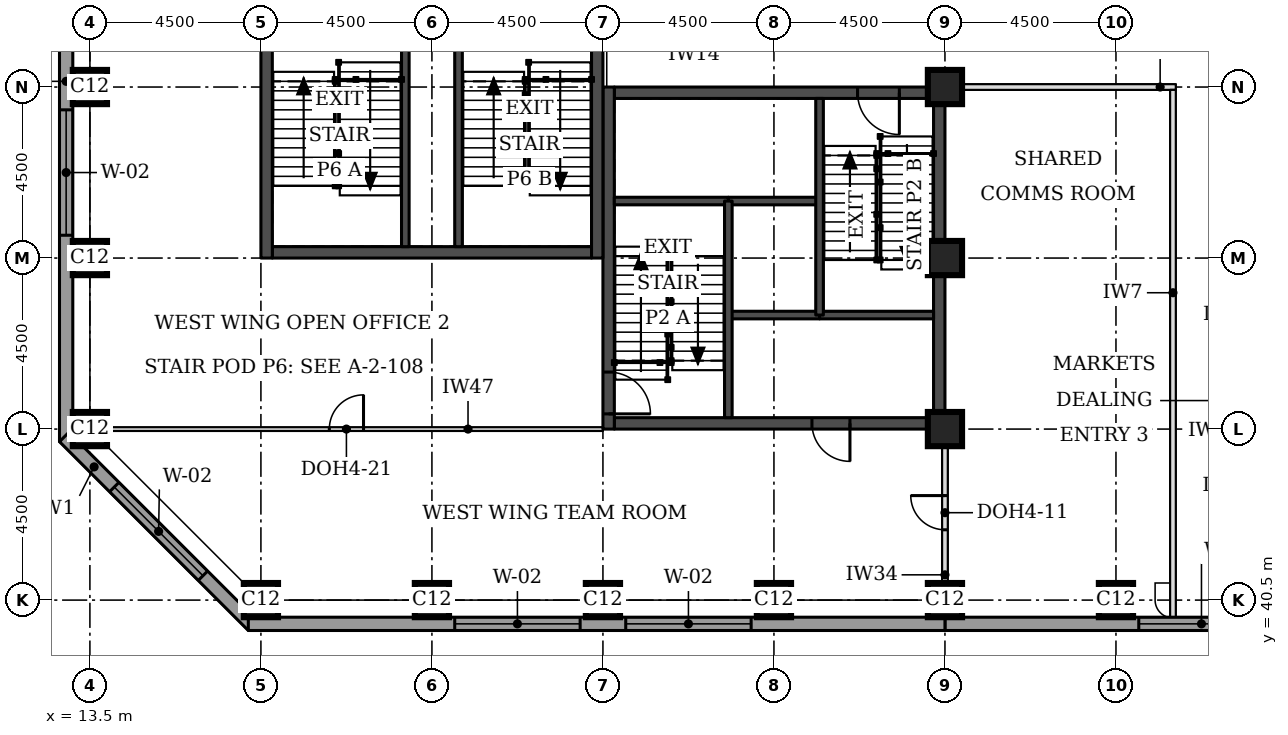
"""IFC4 building model, lengths in metres.
Left out: names, types, materials, properties, quantities, classifications, styles, units other than length and angle.
Written with IfcOpenShell. Run it as: python <this file> out.ifc"""

import sys

from ifc_helpers import new_model, si_unit, direction, frame, frame_2d, origin, origin_2d, place, context, subcontext, project, spatial, rectangle, extrude, element, fill, save


model = new_model("IFC4")
c1 = context("Model", 3, precision=1e-05, world=origin(), true_north=direction((0.0, 1.0)))
c2 = subcontext(c1, "Body", "Model", "MODEL_VIEW")
j1 = project(units=[si_unit("LENGTHUNIT", "METRE"), si_unit("PLANEANGLEUNIT", "RADIAN")], contexts=[c1])
p1 = place(None, origin())
s1 = spatial("IfcSite", under=j1, at=p1, CompositionType="ELEMENT")
p2 = place(p1, origin())
s2 = spatial("IfcBuilding", under=s1, at=p2, CompositionType="ELEMENT")
p3 = place(p2, frame((0.0, 0.0, 169.9)))
s3 = spatial("IfcBuildingStorey", under=s2, at=p3, CompositionType="ELEMENT", Elevation=169.9)
for number, where, z_axis, x_axis in (
    (1, (18.0, 40.5, 0.0), (0.0, 0.0, 1.0), (1.0, 0.0, 0.0)),
    (2, (22.5, 40.5, 0.0), (0.0, 0.0, 1.0), (1.0, 0.0, 0.0)),
    (3, (27.0, 40.5, 0.0), (0.0, 0.0, 1.0), (1.0, 0.0, 0.0)),
    (4, (31.5, 40.5, 0.0), (0.0, 0.0, 1.0), (1.0, 0.0, 0.0)),
    (5, (36.0, 40.5, 0.0), (0.0, 0.0, 1.0), (1.0, 0.0, 0.0)),
    (6, (40.5, 40.5, 0.0), (0.0, 0.0, 1.0), (1.0, 0.0, 0.0)),
    (7, (13.5, 45.0, 0.0), (0.0, 0.0, 1.0), (1.0, 0.0, 0.0)),
    (8, (36.0, 45.0, 0.0), (0.0, 0.0, 1.0), (1.0, 0.0, 0.0)),
    (9, (13.5, 49.5, 0.0), (0.0, 0.0, 1.0), (1.0, 0.0, 0.0)),
    (10, (36.0, 49.5, 0.0), (0.0, 0.0, 1.0), (1.0, 0.0, 0.0)),
    (11, (13.5, 54.0, 0.0), (0.0, 0.0, 1.0), (1.0, 0.0, 0.0)),
    (12, (36.0, 54.0, 0.0), (0.0, 0.0, 1.0), (1.0, 0.0, 0.0)),
):
    element("IfcColumn", number, at=place(p3, frame(where, z_axis=z_axis, x_axis=x_axis)), inside=s3, PredefinedType="COLUMN", context=c2, shape_type="SweptSolid", body=[
        extrude(rectangle(XDim=0.9, YDim=0.9, at=origin_2d()), origin(), (0.0, 0.0, 1.0), 3.7),
    ])
p4 = place(p3, frame((27.3, 45.15, 0.0), z_axis=(0.0, 0.0, 1.0), x_axis=(1.0, 0.0, 0.0)))
e13 = element("IfcWall", 13, at=p4, inside=s3, PredefinedType="SHEAR", context=c2, shape_type="SweptSolid", body=[
    extrude(rectangle(XDim=8.4, YDim=0.3, at=frame_2d((4.2, 0.0))), origin(), (0.0, 0.0, 1.0), 3.7),
])
p5 = place(p4, frame((5.2, 0.0, 0.0)))
e14 = element("IfcOpeningElement", 14, at=p5, cuts=e13, PredefinedType="OPENING", context=c2, shape_type="SweptSolid", body=[
    extrude(rectangle(XDim=1.0, YDim=2.1, at=frame_2d((0.5, 1.05))), frame((0.0, 0.16, 0.0), z_axis=(0.0, -1.0, 0.0), x_axis=(1.0, 0.0, 0.0)), (0.0, 0.0, 1.0), 0.32),
])
p6 = place(p3, frame((27.3, 53.85, 0.0), z_axis=(0.0, 0.0, 1.0), x_axis=(1.0, 0.0, 0.0)))
e15 = element("IfcWall", 15, at=p6, inside=s3, PredefinedType="SHEAR", context=c2, shape_type="SweptSolid", body=[
    extrude(rectangle(XDim=8.4, YDim=0.3, at=frame_2d((4.2, 0.0))), origin(), (0.0, 0.0, 1.0), 3.7),
])
p7 = place(p6, frame((6.4, 0.0, 0.0)))
e16 = element("IfcOpeningElement", 16, at=p7, cuts=e15, PredefinedType="OPENING", context=c2, shape_type="SweptSolid", body=[
    extrude(rectangle(XDim=1.1, YDim=2.1, at=frame_2d((0.55, 1.05))), frame((0.0, 0.16, 0.0), z_axis=(0.0, -1.0, 0.0), x_axis=(1.0, 0.0, 0.0)), (0.0, 0.0, 1.0), 0.32),
])
p8 = place(p3, frame((27.15, 45.0, 0.0), z_axis=(0.0, 0.0, 1.0), x_axis=(0.0, 1.0, 0.0)))
e17 = element("IfcWall", 17, at=p8, inside=s3, PredefinedType="SHEAR", context=c2, shape_type="SweptSolid", body=[
    extrude(rectangle(XDim=9.0, YDim=0.3, at=frame_2d((4.5, 0.0))), origin(), (0.0, 0.0, 1.0), 3.7),
])
p9 = place(p8, frame((0.4, 0.0, 0.0)))
e18 = element("IfcOpeningElement", 18, at=p9, cuts=e17, PredefinedType="OPENING", context=c2, shape_type="SweptSolid", body=[
    extrude(rectangle(XDim=1.1, YDim=2.1, at=frame_2d((0.55, 1.05))), frame((0.0, 0.16, 0.0), z_axis=(0.0, -1.0, 0.0), x_axis=(1.0, 0.0, 0.0)), (0.0, 0.0, 1.0), 0.32),
])
p10 = place(p3, frame((35.85, 45.0, 0.0), z_axis=(0.0, 0.0, 1.0), x_axis=(0.0, 1.0, 0.0)))
e19 = element("IfcWall", 19, at=p10, inside=s3, PredefinedType="SHEAR", context=c2, shape_type="SweptSolid", body=[
    extrude(rectangle(XDim=9.0, YDim=0.3, at=frame_2d((4.5, 0.0))), origin(), (0.0, 0.0, 1.0), 3.7),
])
p11 = place(p3, frame((18.3, 49.65, 0.0), z_axis=(0.0, 0.0, 1.0), x_axis=(1.0, 0.0, 0.0)))
e20 = element("IfcWall", 20, at=p11, inside=s3, PredefinedType="SHEAR", context=c2, shape_type="SweptSolid", body=[
    extrude(rectangle(XDim=8.4, YDim=0.3, at=frame_2d((4.2, 0.0))), origin(), (0.0, 0.0, 1.0), 3.7),
])
p12 = place(p3, frame((18.15, 49.5, 0.0), z_axis=(0.0, 0.0, 1.0), x_axis=(0.0, 1.0, 0.0)))
e21 = element("IfcWall", 21, at=p12, inside=s3, PredefinedType="SHEAR", context=c2, shape_type="SweptSolid", body=[
    extrude(rectangle(XDim=9.0, YDim=0.3, at=frame_2d((4.5, 0.0))), origin(), (0.0, 0.0, 1.0), 3.7),
])
p13 = place(p3, frame((26.85, 49.5, 0.0), z_axis=(0.0, 0.0, 1.0), x_axis=(0.0, 1.0, 0.0)))
e22 = element("IfcWall", 22, at=p13, inside=s3, PredefinedType="SHEAR", context=c2, shape_type="SweptSolid", body=[
    extrude(rectangle(XDim=9.0, YDim=0.3, at=frame_2d((4.5, 0.0))), origin(), (0.0, 0.0, 1.0), 3.7),
])
p14 = place(p13, frame((6.6, 0.0, 0.0)))
e23 = element("IfcOpeningElement", 23, at=p14, cuts=e22, PredefinedType="OPENING", context=c2, shape_type="SweptSolid", body=[
    extrude(rectangle(XDim=1.8, YDim=2.1, at=frame_2d((0.9, 1.05))), frame((0.0, 0.16, 0.0), z_axis=(0.0, -1.0, 0.0), x_axis=(1.0, 0.0, 0.0)), (0.0, 0.0, 1.0), 0.32),
])
p15 = place(p3, frame((36.0, 39.875, 0.0), z_axis=(0.0, 0.0, 1.0), x_axis=(1.0, 0.0, 0.0)))
e24 = element("IfcWall", 24, at=p15, inside=s3, PredefinedType="STANDARD", context=c2, shape_type="SweptSolid", body=[
    extrude(rectangle(XDim=36.331, YDim=0.35, at=frame_2d((18.166, 0.0))), origin(), (0.0, 0.0, 1.0), 3.525),
])
p16 = place(p15, frame((5.1, 0.0, 0.9)))
e25 = element("IfcOpeningElement", 25, at=p16, cuts=e24, PredefinedType="OPENING", context=c2, shape_type="SweptSolid", body=[
    extrude(rectangle(XDim=3.3, YDim=1.9, at=frame_2d((1.65, 0.95))), frame((0.0, 0.185, 0.0), z_axis=(0.0, -1.0, 0.0), x_axis=(1.0, 0.0, 0.0)), (0.0, 0.0, 1.0), 0.37),
])
p17 = place(p15, frame((9.6, 0.0, 0.9)))
e26 = element("IfcOpeningElement", 26, at=p17, cuts=e24, PredefinedType="OPENING", context=c2, shape_type="SweptSolid", body=[
    extrude(rectangle(XDim=3.3, YDim=1.9, at=frame_2d((1.65, 0.95))), frame((0.0, 0.185, 0.0), z_axis=(0.0, -1.0, 0.0), x_axis=(1.0, 0.0, 0.0)), (0.0, 0.0, 1.0), 0.37),
])
p18 = place(p15, frame((14.1, 0.0, 0.9)))
e27 = element("IfcOpeningElement", 27, at=p18, cuts=e24, PredefinedType="OPENING", context=c2, shape_type="SweptSolid", body=[
    extrude(rectangle(XDim=3.3, YDim=1.9, at=frame_2d((1.65, 0.95))), frame((0.0, 0.185, 0.0), z_axis=(0.0, -1.0, 0.0), x_axis=(1.0, 0.0, 0.0)), (0.0, 0.0, 1.0), 0.37),
])
p19 = place(p15, frame((18.6, 0.0, 0.9)))
e28 = element("IfcOpeningElement", 28, at=p19, cuts=e24, PredefinedType="OPENING", context=c2, shape_type="SweptSolid", body=[
    extrude(rectangle(XDim=3.3, YDim=1.9, at=frame_2d((1.65, 0.95))), frame((0.0, 0.185, 0.0), z_axis=(0.0, -1.0, 0.0), x_axis=(1.0, 0.0, 0.0)), (0.0, 0.0, 1.0), 0.37),
])
p20 = place(p15, frame((23.1, 0.0, 0.9)))
e29 = element("IfcOpeningElement", 29, at=p20, cuts=e24, PredefinedType="OPENING", context=c2, shape_type="SweptSolid", body=[
    extrude(rectangle(XDim=3.3, YDim=1.9, at=frame_2d((1.65, 0.95))), frame((0.0, 0.185, 0.0), z_axis=(0.0, -1.0, 0.0), x_axis=(1.0, 0.0, 0.0)), (0.0, 0.0, 1.0), 0.37),
])
p21 = place(p15, frame((27.6, 0.0, 0.9)))
e30 = element("IfcOpeningElement", 30, at=p21, cuts=e24, PredefinedType="OPENING", context=c2, shape_type="SweptSolid", body=[
    extrude(rectangle(XDim=3.3, YDim=1.9, at=frame_2d((1.65, 0.95))), frame((0.0, 0.185, 0.0), z_axis=(0.0, -1.0, 0.0), x_axis=(1.0, 0.0, 0.0)), (0.0, 0.0, 1.0), 0.37),
])
p22 = place(p3, frame((12.875, 58.831, 0.0), z_axis=(0.0, 0.0, 1.0), x_axis=(0.0, -1.0, 0.0)))
e31 = element("IfcWall", 31, at=p22, inside=s3, PredefinedType="STANDARD", context=c2, shape_type="SweptSolid", body=[
    extrude(rectangle(XDim=14.163, YDim=0.35, at=frame_2d((7.081, 0.0))), origin(), (0.0, 0.0, 1.0), 3.525),
])
p23 = place(p22, frame((5.431, 0.0, 0.9)))
e32 = element("IfcOpeningElement", 32, at=p23, cuts=e31, PredefinedType="OPENING", context=c2, shape_type="SweptSolid", body=[
    extrude(rectangle(XDim=3.3, YDim=1.9, at=frame_2d((1.65, 0.95))), frame((0.0, 0.185, 0.0), z_axis=(0.0, -1.0, 0.0), x_axis=(1.0, 0.0, 0.0)), (0.0, 0.0, 1.0), 0.37),
])
p24 = place(p3, frame((12.824, 44.792, 0.0), z_axis=(0.0, 0.0, 1.0), x_axis=(0.707106781187, -0.707106781187, 0.0)))
e33 = element("IfcWall", 33, at=p24, inside=s3, PredefinedType="STANDARD", context=c2, shape_type="SweptSolid", body=[
    extrude(rectangle(XDim=7.027, YDim=0.35, at=frame_2d((3.513, 0.0))), origin(), (0.0, 0.0, 1.0), 3.525),
])
p25 = place(p24, frame((1.863, 0.0, 0.9)))
e34 = element("IfcOpeningElement", 34, at=p25, cuts=e33, PredefinedType="OPENING", context=c2, shape_type="SweptSolid", body=[
    extrude(rectangle(XDim=3.3, YDim=1.9, at=frame_2d((1.65, 0.95))), frame((0.0, 0.185, 0.0), z_axis=(0.0, -1.0, 0.0), x_axis=(1.0, 0.0, 0.0)), (0.0, 0.0, 1.0), 0.37),
])
p26 = place(p3, frame((17.669, 39.875, 0.0), z_axis=(0.0, 0.0, 1.0), x_axis=(1.0, 0.0, 0.0)))
e35 = element("IfcWall", 35, at=p26, inside=s3, PredefinedType="STANDARD", context=c2, shape_type="SweptSolid", body=[
    extrude(rectangle(XDim=18.331, YDim=0.35, at=frame_2d((9.166, 0.0))), origin(), (0.0, 0.0, 1.0), 3.525),
])
p27 = place(p26, frame((5.431, 0.0, 0.9)))
e36 = element("IfcOpeningElement", 36, at=p27, cuts=e35, PredefinedType="OPENING", context=c2, shape_type="SweptSolid", body=[
    extrude(rectangle(XDim=3.3, YDim=1.9, at=frame_2d((1.65, 0.95))), frame((0.0, 0.185, 0.0), z_axis=(0.0, -1.0, 0.0), x_axis=(1.0, 0.0, 0.0)), (0.0, 0.0, 1.0), 0.37),
])
p28 = place(p26, frame((9.931, 0.0, 0.9)))
e37 = element("IfcOpeningElement", 37, at=p28, cuts=e35, PredefinedType="OPENING", context=c2, shape_type="SweptSolid", body=[
    extrude(rectangle(XDim=3.3, YDim=1.9, at=frame_2d((1.65, 0.95))), frame((0.0, 0.185, 0.0), z_axis=(0.0, -1.0, 0.0), x_axis=(1.0, 0.0, 0.0)), (0.0, 0.0, 1.0), 0.37),
])
p29 = place(p3, frame((36.45, 54.0, 0.0), z_axis=(0.0, 0.0, 1.0), x_axis=(1.0, 0.0, 0.0)))
e38 = element("IfcWall", 38, at=p29, inside=s3, PredefinedType="PARTITIONING", context=c2, shape_type="SweptSolid", body=[
    extrude(rectangle(XDim=5.625, YDim=0.15, at=frame_2d((2.812, 0.0))), origin(), (0.0, 0.0, 1.0), 3.55),
])
p30 = place(p3, frame((42.0, 40.05, 0.0), z_axis=(0.0, 0.0, 1.0), x_axis=(0.0, 1.0, 0.0)))
e39 = element("IfcWall", 39, at=p30, inside=s3, PredefinedType="PARTITIONING", context=c2, shape_type="SweptSolid", body=[
    extrude(rectangle(XDim=13.875, YDim=0.15, at=frame_2d((6.938, 0.0))), origin(), (0.0, 0.0, 1.0), 3.55),
])
p31 = place(p3, frame((36.0, 40.95, 0.0), z_axis=(0.0, 0.0, 1.0), x_axis=(0.0, 1.0, 0.0)))
e40 = element("IfcWall", 40, at=p31, inside=s3, PredefinedType="PARTITIONING", context=c2, shape_type="SweptSolid", body=[
    extrude(rectangle(XDim=3.63, YDim=0.15, at=frame_2d((1.815, 0.0))), origin(), (0.0, 0.0, 1.0), 2.8),
])
p32 = place(p31, frame((1.4, 0.0, 0.0)))
e41 = element("IfcOpeningElement", 41, at=p32, cuts=e40, PredefinedType="OPENING", context=c2, shape_type="SweptSolid", body=[
    extrude(rectangle(XDim=0.9, YDim=2.1, at=frame_2d((0.45, 1.05))), frame((0.0, 0.085, 0.0), z_axis=(0.0, -1.0, 0.0), x_axis=(1.0, 0.0, 0.0)), (0.0, 0.0, 1.0), 0.17),
])
p33 = place(p3, frame((27.0, 45.0, 0.0), z_axis=(0.0, 0.0, 1.0), x_axis=(-1.0, 0.0, 0.0)))
e42 = element("IfcWall", 42, at=p33, inside=s3, PredefinedType="PARTITIONING", context=c2, shape_type="SweptSolid", body=[
    extrude(rectangle(XDim=13.5, YDim=0.1, at=frame_2d((6.75, 0.0))), origin(), (0.0, 0.0, 1.0), 2.55),
])
p34 = place(p33, frame((6.3, 0.0, 0.0)))
e43 = element("IfcOpeningElement", 43, at=p34, cuts=e42, PredefinedType="OPENING", context=c2, shape_type="SweptSolid", body=[
    extrude(rectangle(XDim=0.9, YDim=2.1, at=frame_2d((0.45, 1.05))), frame((0.0, 0.06, 0.0), z_axis=(0.0, -1.0, 0.0), x_axis=(1.0, 0.0, 0.0)), (0.0, 0.0, 1.0), 0.12),
])
p35 = place(p3, frame((30.3, 48.0, 0.0), z_axis=(0.0, 0.0, 1.0), x_axis=(1.0, 0.0, 0.0)))
e44 = element("IfcWall", 44, at=p35, inside=s3, PredefinedType="SOLIDWALL", context=c2, shape_type="SweptSolid", body=[
    extrude(rectangle(XDim=2.4, YDim=0.2, at=frame_2d((1.2, 0.0))), origin(), (0.0, 0.0, 1.0), 3.55),
])
p36 = place(p3, frame((32.7, 48.0, 0.0), z_axis=(0.0, 0.0, 1.0), x_axis=(1.0, 0.0, 0.0)))
e45 = element("IfcWall", 45, at=p36, inside=s3, PredefinedType="SOLIDWALL", context=c2, shape_type="SweptSolid", body=[
    extrude(rectangle(XDim=3.0, YDim=0.2, at=frame_2d((1.5, 0.0))), origin(), (0.0, 0.0, 1.0), 3.55),
])
p37 = place(p3, frame((30.3, 51.0, 0.0), z_axis=(0.0, 0.0, 1.0), x_axis=(1.0, 0.0, 0.0)))
e46 = element("IfcWall", 46, at=p37, inside=s3, PredefinedType="SOLIDWALL", context=c2, shape_type="SweptSolid", body=[
    extrude(rectangle(XDim=2.4, YDim=0.2, at=frame_2d((1.2, 0.0))), origin(), (0.0, 0.0, 1.0), 3.7),
])
p38 = place(p3, frame((27.3, 51.0, 0.0), z_axis=(0.0, 0.0, 1.0), x_axis=(1.0, 0.0, 0.0)))
e47 = element("IfcWall", 47, at=p38, inside=s3, PredefinedType="SOLIDWALL", context=c2, shape_type="SweptSolid", body=[
    extrude(rectangle(XDim=3.0, YDim=0.2, at=frame_2d((1.5, 0.0))), origin(), (0.0, 0.0, 1.0), 3.55),
])
for number, where, z_axis, x_axis in (
    (48, (30.3, 45.3, 0.0), (0.0, 0.0, 1.0), (0.0, 1.0, 0.0)),
    (49, (32.7, 48.0, 0.0), (0.0, 0.0, 1.0), (0.0, 1.0, 0.0)),
):
    element("IfcWall", number, at=place(p3, frame(where, z_axis=z_axis, x_axis=x_axis)), inside=s3, PredefinedType="SOLIDWALL", context=c2, shape_type="SweptSolid", body=[
        extrude(rectangle(XDim=5.7, YDim=0.2, at=frame_2d((2.85, 0.0))), origin(), (0.0, 0.0, 1.0), 3.55),
    ])
for number, where, z_axis, x_axis in (
    (50, (21.8, 49.8, 0.0), (0.0, 0.0, 1.0), (0.0, 1.0, 0.0)),
    (51, (23.2, 49.8, 0.0), (0.0, 0.0, 1.0), (0.0, 1.0, 0.0)),
):
    element("IfcWall", number, at=place(p3, frame(where, z_axis=z_axis, x_axis=x_axis)), inside=s3, PredefinedType="SOLIDWALL", context=c2, shape_type="SweptSolid", body=[
        extrude(rectangle(XDim=6.05, YDim=0.2, at=frame_2d((3.025, 0.0))), origin(), (0.0, 0.0, 1.0), 3.55),
    ])
p39 = place(p16, origin())
e52 = element("IfcWindow", 52, at=p39, inside=s3, PartitioningType="SINGLE_PANEL", PredefinedType="WINDOW", context=c2, shape_type="SweptSolid", body=[
    extrude(rectangle(XDim=3.3, YDim=1.9, at=frame_2d((1.65, 0.95))), frame((0.0, 0.085, 0.0), z_axis=(0.0, -1.0, 0.0), x_axis=(1.0, 0.0, 0.0)), (0.0, 0.0, 1.0), 0.06),
])
fill(e25, e52)
p40 = place(p23, origin())
e53 = element("IfcWindow", 53, at=p40, inside=s3, PartitioningType="SINGLE_PANEL", PredefinedType="WINDOW", context=c2, shape_type="SweptSolid", body=[
    extrude(rectangle(XDim=3.3, YDim=1.9, at=frame_2d((1.65, 0.95))), frame((0.0, 0.085, 0.0), z_axis=(0.0, -1.0, 0.0), x_axis=(1.0, 0.0, 0.0)), (0.0, 0.0, 1.0), 0.06),
])
fill(e32, e53)
p41 = place(p25, origin())
e54 = element("IfcWindow", 54, at=p41, inside=s3, PartitioningType="SINGLE_PANEL", PredefinedType="WINDOW", context=c2, shape_type="SweptSolid", body=[
    extrude(rectangle(XDim=3.3, YDim=1.9, at=frame_2d((1.65, 0.95))), frame((0.0, 0.085, 0.0), z_axis=(0.0, -1.0, 0.0), x_axis=(1.0, 0.0, 0.0)), (0.0, 0.0, 1.0), 0.06),
])
fill(e34, e54)
p42 = place(p27, origin())
e55 = element("IfcWindow", 55, at=p42, inside=s3, PartitioningType="SINGLE_PANEL", PredefinedType="WINDOW", context=c2, shape_type="SweptSolid", body=[
    extrude(rectangle(XDim=3.3, YDim=1.9, at=frame_2d((1.65, 0.95))), frame((0.0, 0.085, 0.0), z_axis=(0.0, -1.0, 0.0), x_axis=(1.0, 0.0, 0.0)), (0.0, 0.0, 1.0), 0.06),
])
fill(e36, e55)
p43 = place(p28, origin())
e56 = element("IfcWindow", 56, at=p43, inside=s3, PartitioningType="SINGLE_PANEL", PredefinedType="WINDOW", context=c2, shape_type="SweptSolid", body=[
    extrude(rectangle(XDim=3.3, YDim=1.9, at=frame_2d((1.65, 0.95))), frame((0.0, 0.085, 0.0), z_axis=(0.0, -1.0, 0.0), x_axis=(1.0, 0.0, 0.0)), (0.0, 0.0, 1.0), 0.06),
])
fill(e37, e56)
p44 = place(p32, origin())
e57 = element("IfcDoor", 57, at=p44, inside=s3, OperationType="SINGLE_SWING_RIGHT", PredefinedType="DOOR", context=c2, shape_type="SweptSolid", body=[
    extrude(rectangle(XDim=0.9, YDim=2.1, at=frame_2d((0.45, 1.05))), frame((0.0, 0.025, 0.0), z_axis=(0.0, -1.0, 0.0), x_axis=(1.0, 0.0, 0.0)), (0.0, 0.0, 1.0), 0.05),
])
fill(e41, e57)
p45 = place(p34, frame((0.9, 0.0, 0.0), z_axis=(0.0, 0.0, 1.0), x_axis=(-1.0, 0.0, 0.0)))
e58 = element("IfcDoor", 58, at=p45, inside=s3, OperationType="SINGLE_SWING_RIGHT", PredefinedType="DOOR", context=c2, shape_type="SweptSolid", body=[
    extrude(rectangle(XDim=0.9, YDim=2.1, at=frame_2d((0.45, 1.05))), frame((0.0, 0.025, 0.0), z_axis=(0.0, -1.0, 0.0), x_axis=(1.0, 0.0, 0.0)), (0.0, 0.0, 1.0), 0.05),
])
fill(e43, e58)
p46 = place(p9, frame((1.1, 0.0, 0.0), z_axis=(0.0, 0.0, 1.0), x_axis=(-1.0, 0.0, 0.0)))
e59 = element("IfcDoor", 59, at=p46, inside=s3, OperationType="SINGLE_SWING_RIGHT", PredefinedType="DOOR", context=c2, shape_type="SweptSolid", body=[
    extrude(rectangle(XDim=1.1, YDim=2.1, at=frame_2d((0.55, 1.05))), frame((0.0, 0.025, 0.0), z_axis=(0.0, -1.0, 0.0), x_axis=(1.0, 0.0, 0.0)), (0.0, 0.0, 1.0), 0.05),
])
fill(e18, e59)
p47 = place(p7, frame((1.1, 0.0, 0.0), z_axis=(0.0, 0.0, 1.0), x_axis=(-1.0, 0.0, 0.0)))
e60 = element("IfcDoor", 60, at=p47, inside=s3, OperationType="SINGLE_SWING_LEFT", PredefinedType="DOOR", context=c2, shape_type="SweptSolid", body=[
    extrude(rectangle(XDim=1.1, YDim=2.1, at=frame_2d((0.55, 1.05))), frame((0.0, 0.025, 0.0), z_axis=(0.0, -1.0, 0.0), x_axis=(1.0, 0.0, 0.0)), (0.0, 0.0, 1.0), 0.05),
])
fill(e16, e60)
p48 = place(p5, frame((1.0, 0.0, 0.0), z_axis=(0.0, 0.0, 1.0), x_axis=(-1.0, 0.0, 0.0)))
e61 = element("IfcDoor", 61, at=p48, inside=s3, OperationType="SINGLE_SWING_LEFT", PredefinedType="DOOR", context=c2, shape_type="SweptSolid", body=[
    extrude(rectangle(XDim=1.0, YDim=2.1, at=frame_2d((0.5, 1.05))), frame((0.0, 0.025, 0.0), z_axis=(0.0, -1.0, 0.0), x_axis=(1.0, 0.0, 0.0)), (0.0, 0.0, 1.0), 0.05),
])
fill(e14, e61)
save(model, sys.argv[1])
